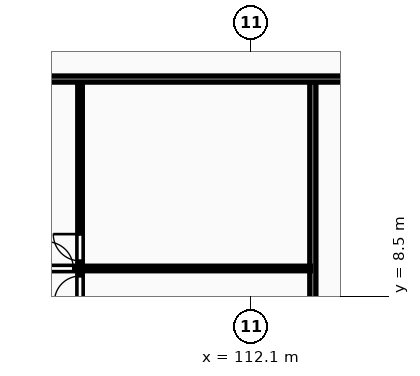
"""IFC4 building model, lengths in metres.
Left out: names, types, materials, properties, quantities, classifications, styles, units other than length and angle.
Written with IfcOpenShell. Run it as: python <this file> out.ifc"""

import sys

from ifc_helpers import new_model, si_unit, direction, frame, frame_2d, origin, place, context, subcontext, project, spatial, rectangle, extrude, element, fill, save


model = new_model("IFC4")
c1 = context("Model", 3, precision=1e-05, world=origin(), true_north=direction((0.0, 1.0)))
c2 = subcontext(c1, "Body", "Model", "MODEL_VIEW")
j1 = project(units=[si_unit("LENGTHUNIT", "METRE"), si_unit("PLANEANGLEUNIT", "RADIAN")], contexts=[c1])
p1 = place(None, origin())
s1 = spatial("IfcSite", under=j1, at=p1, CompositionType="ELEMENT")
p2 = place(p1, origin())
s2 = spatial("IfcBuilding", under=s1, at=p2, CompositionType="ELEMENT")
p3 = place(p2, frame((0.0, 0.0, 201.1)))
s3 = spatial("IfcBuildingStorey", under=s2, at=p3, CompositionType="ELEMENT", Elevation=201.1)
p4 = place(p3, frame((114.142, -7.5, 0.0), z_axis=(0.0, 0.0, 1.0), x_axis=(0.0, 1.0, 0.0)))
e1 = element("IfcWall", 1, at=p4, inside=s3, PredefinedType="PARTITIONING", context=c2, shape_type="SweptSolid", body=[
    extrude(rectangle(XDim=23.07, YDim=0.2, at=frame_2d((11.535, 0.0))), origin(), (0.0, 0.0, 1.0), 2.97),
])
p5 = place(p3, frame((106.484, 2.89, 0.0), z_axis=(0.0, 0.0, 1.0), x_axis=(0.0, 1.0, 0.0)))
e2 = element("IfcWall", 2, at=p5, inside=s3, PredefinedType="PARTITIONING", context=c2, shape_type="SweptSolid", body=[
    extrude(rectangle(XDim=12.7, YDim=0.15, at=frame_2d((6.35, 0.0))), origin(), (0.0, 0.0, 1.0), 2.97),
])
p6 = place(p5, frame((5.44, 0.0, 0.0)))
e3 = element("IfcOpeningElement", 3, at=p6, cuts=e2, PredefinedType="OPENING", context=c2, shape_type="SweptSolid", body=[
    extrude(rectangle(XDim=0.84, YDim=2.04, at=frame_2d((0.42, 1.02))), frame((0.0, 0.085, 0.0), z_axis=(0.0, -1.0, 0.0), x_axis=(1.0, 0.0, 0.0)), (0.0, 0.0, 1.0), 0.17),
])
p7 = place(p5, frame((6.78, 0.0, 0.0)))
e4 = element("IfcOpeningElement", 4, at=p7, cuts=e2, PredefinedType="OPENING", context=c2, shape_type="SweptSolid", body=[
    extrude(rectangle(XDim=0.88, YDim=2.06, at=frame_2d((0.44, 1.03))), frame((0.0, 0.085, 0.0), z_axis=(0.0, -1.0, 0.0), x_axis=(1.0, 0.0, 0.0)), (0.0, 0.0, 1.0), 0.17),
])
p8 = place(p3, frame((99.147, 9.42, 0.0), z_axis=(0.0, 0.0, 1.0), x_axis=(1.0, 0.0, 0.0)))
e5 = element("IfcWall", 5, at=p8, inside=s3, PredefinedType="PARTITIONING", context=c2, shape_type="SweptSolid", body=[
    extrude(rectangle(XDim=14.915, YDim=0.15, at=frame_2d((7.458, 0.0))), origin(), (0.0, 0.0, 1.0), 2.97),
])
p9 = place(p8, frame((6.238, 0.0, 0.0)))
e6 = element("IfcOpeningElement", 6, at=p9, cuts=e5, PredefinedType="OPENING", context=c2, shape_type="SweptSolid", body=[
    extrude(rectangle(XDim=0.88, YDim=2.06, at=frame_2d((0.44, 1.03))), frame((0.0, 0.085, 0.0), z_axis=(0.0, -1.0, 0.0), x_axis=(1.0, 0.0, 0.0)), (0.0, 0.0, 1.0), 0.17),
])
p10 = place(p3, frame((74.5, 15.65, 0.0), z_axis=(0.0, 0.0, 1.0), x_axis=(1.0, 0.0, 0.0)))
e7 = element("IfcWall", 7, at=p10, inside=s3, PredefinedType="PARTITIONING", context=c2, shape_type="SweptSolid", body=[
    extrude(rectangle(XDim=54.4, YDim=0.2, at=frame_2d((27.2, 0.0))), origin(), (0.0, 0.0, 1.0), 2.97),
])
p11 = place(p10, frame((8.618, 0.0, 0.0)))
e8 = element("IfcOpeningElement", 8, at=p11, cuts=e7, PredefinedType="OPENING", context=c2, shape_type="SweptSolid", body=[
    extrude(rectangle(XDim=1.22, YDim=2.18, at=frame_2d((0.61, 1.09))), frame((0.0, 0.11, 0.0), z_axis=(0.0, -1.0, 0.0), x_axis=(1.0, 0.0, 0.0)), (0.0, 0.0, 1.0), 0.22),
])
p12 = place(p10, frame((22.662, 0.0, 0.0)))
e9 = element("IfcOpeningElement", 9, at=p12, cuts=e7, PredefinedType="OPENING", context=c2, shape_type="SweptSolid", body=[
    extrude(rectangle(XDim=0.95, YDim=2.15, at=frame_2d((0.475, 1.075))), frame((0.0, 0.11, 0.0), z_axis=(0.0, -1.0, 0.0), x_axis=(1.0, 0.0, 0.0)), (0.0, 0.0, 1.0), 0.22),
])
p13 = place(p10, frame((41.687, 0.0, 0.0)))
e10 = element("IfcOpeningElement", 10, at=p13, cuts=e7, PredefinedType="OPENING", context=c2, shape_type="SweptSolid", body=[
    extrude(rectangle(XDim=0.95, YDim=2.15, at=frame_2d((0.475, 1.075))), frame((0.0, 0.11, 0.0), z_axis=(0.0, -1.0, 0.0), x_axis=(1.0, 0.0, 0.0)), (0.0, 0.0, 1.0), 0.22),
])
p14 = place(p6, origin())
e11 = element("IfcDoor", 11, at=p14, inside=s3, OperationType="SINGLE_SWING_LEFT", PredefinedType="DOOR", context=c2, shape_type="SweptSolid", body=[
    extrude(rectangle(XDim=0.84, YDim=2.04, at=frame_2d((0.42, 1.02))), frame((0.0, 0.025, 0.0), z_axis=(0.0, -1.0, 0.0), x_axis=(1.0, 0.0, 0.0)), (0.0, 0.0, 1.0), 0.05),
])
fill(e3, e11)
p15 = place(p7, origin())
e12 = element("IfcDoor", 12, at=p15, inside=s3, OperationType="SINGLE_SWING_RIGHT", PredefinedType="DOOR", context=c2, shape_type="SweptSolid", body=[
    extrude(rectangle(XDim=0.88, YDim=2.06, at=frame_2d((0.44, 1.03))), frame((0.0, 0.025, 0.0), z_axis=(0.0, -1.0, 0.0), x_axis=(1.0, 0.0, 0.0)), (0.0, 0.0, 1.0), 0.05),
])
fill(e4, e12)
p16 = place(p9, origin())
e13 = element("IfcDoor", 13, at=p16, inside=s3, OperationType="SINGLE_SWING_LEFT", PredefinedType="DOOR", context=c2, shape_type="SweptSolid", body=[
    extrude(rectangle(XDim=0.88, YDim=2.06, at=frame_2d((0.44, 1.03))), frame((0.0, 0.025, 0.0), z_axis=(0.0, -1.0, 0.0), x_axis=(1.0, 0.0, 0.0)), (0.0, 0.0, 1.0), 0.05),
])
fill(e6, e13)
save(model, sys.argv[1])
